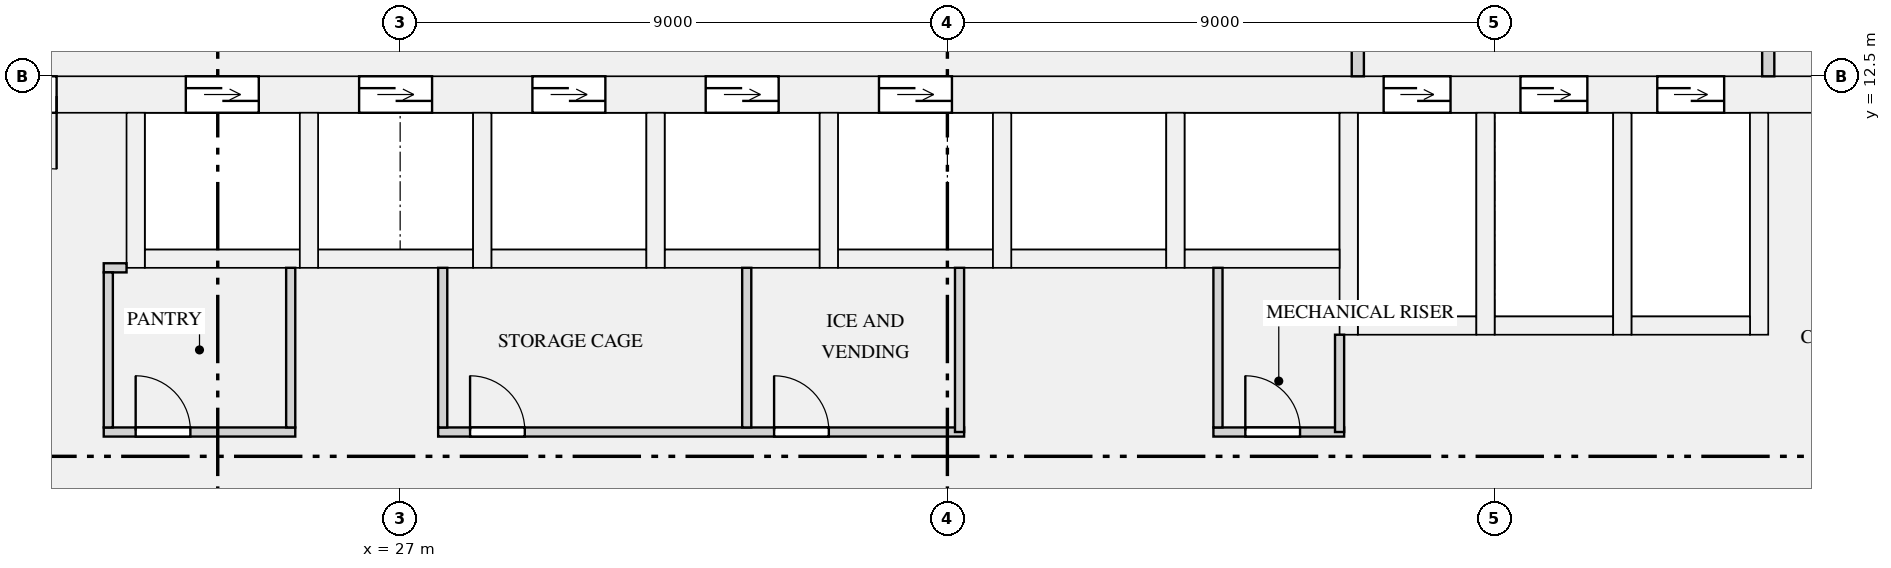
"""IFC4 building model, lengths in metres.
Left out: names, types, materials, properties, quantities, classifications, styles, units other than length and angle.
Written with IfcOpenShell. Run it as: python <this file> out.ifc"""

import sys

from ifc_helpers import new_model, si_unit, direction, frame, frame_2d, origin, place, context, subcontext, project, spatial, rectangle, extrude, element, fill, save


model = new_model("IFC4")
c1 = context("Model", 3, precision=1e-05, world=origin(), true_north=direction((0.0, 1.0)))
c2 = subcontext(c1, "Body", "Model", "MODEL_VIEW")
j1 = project(units=[si_unit("LENGTHUNIT", "METRE"), si_unit("PLANEANGLEUNIT", "RADIAN")], contexts=[c1])
p1 = place(None, origin())
s1 = spatial("IfcSite", under=j1, at=p1, CompositionType="ELEMENT")
p2 = place(p1, origin())
s2 = spatial("IfcBuilding", under=s1, at=p2, CompositionType="ELEMENT")
p3 = place(p2, frame((0.0, 0.0, 73.05)))
s3 = spatial("IfcBuildingStorey", under=s2, at=p3, CompositionType="ELEMENT", Elevation=73.05)
p4 = place(p3, frame((19.0, 12.2, 0.0), z_axis=(0.0, 0.0, 1.0), x_axis=(1.0, 0.0, 0.0)))
e1 = element("IfcWall", 1, at=p4, inside=s3, PredefinedType="SHEAR", context=c2, shape_type="SweptSolid", body=[
    extrude(rectangle(XDim=34.0, YDim=0.6, at=frame_2d((17.0, 0.0))), origin(), (0.0, 0.0, 1.0), 4.2),
])
p5 = place(p4, frame((4.475, 0.0, 0.0)))
e2 = element("IfcOpeningElement", 2, at=p5, cuts=e1, PredefinedType="OPENING", context=c2, shape_type="SweptSolid", body=[
    extrude(rectangle(XDim=1.2, YDim=2.1, at=frame_2d((0.6, 1.05))), frame((0.0, 0.31, 0.0), z_axis=(0.0, -1.0, 0.0), x_axis=(1.0, 0.0, 0.0)), (0.0, 0.0, 1.0), 0.62),
])
p6 = place(p4, frame((7.325, 0.0, 0.0)))
e3 = element("IfcOpeningElement", 3, at=p6, cuts=e1, PredefinedType="OPENING", context=c2, shape_type="SweptSolid", body=[
    extrude(rectangle(XDim=1.2, YDim=2.1, at=frame_2d((0.6, 1.05))), frame((0.0, 0.31, 0.0), z_axis=(0.0, -1.0, 0.0), x_axis=(1.0, 0.0, 0.0)), (0.0, 0.0, 1.0), 0.62),
])
p7 = place(p4, frame((10.175, 0.0, 0.0)))
e4 = element("IfcOpeningElement", 4, at=p7, cuts=e1, PredefinedType="OPENING", context=c2, shape_type="SweptSolid", body=[
    extrude(rectangle(XDim=1.2, YDim=2.1, at=frame_2d((0.6, 1.05))), frame((0.0, 0.31, 0.0), z_axis=(0.0, -1.0, 0.0), x_axis=(1.0, 0.0, 0.0)), (0.0, 0.0, 1.0), 0.62),
])
p8 = place(p4, frame((13.025, 0.0, 0.0)))
e5 = element("IfcOpeningElement", 5, at=p8, cuts=e1, PredefinedType="OPENING", context=c2, shape_type="SweptSolid", body=[
    extrude(rectangle(XDim=1.2, YDim=2.1, at=frame_2d((0.6, 1.05))), frame((0.0, 0.31, 0.0), z_axis=(0.0, -1.0, 0.0), x_axis=(1.0, 0.0, 0.0)), (0.0, 0.0, 1.0), 0.62),
])
p9 = place(p4, frame((15.875, 0.0, 0.0)))
e6 = element("IfcOpeningElement", 6, at=p9, cuts=e1, PredefinedType="OPENING", context=c2, shape_type="SweptSolid", body=[
    extrude(rectangle(XDim=1.2, YDim=2.1, at=frame_2d((0.6, 1.05))), frame((0.0, 0.31, 0.0), z_axis=(0.0, -1.0, 0.0), x_axis=(1.0, 0.0, 0.0)), (0.0, 0.0, 1.0), 0.62),
])
p10 = place(p4, frame((24.175, 0.0, 0.0)))
e7 = element("IfcOpeningElement", 7, at=p10, cuts=e1, PredefinedType="OPENING", context=c2, shape_type="SweptSolid", body=[
    extrude(rectangle(XDim=1.1, YDim=2.1, at=frame_2d((0.55, 1.05))), frame((0.0, 0.31, 0.0), z_axis=(0.0, -1.0, 0.0), x_axis=(1.0, 0.0, 0.0)), (0.0, 0.0, 1.0), 0.62),
])
p11 = place(p4, frame((26.425, 0.0, 0.0)))
e8 = element("IfcOpeningElement", 8, at=p11, cuts=e1, PredefinedType="OPENING", context=c2, shape_type="SweptSolid", body=[
    extrude(rectangle(XDim=1.1, YDim=2.1, at=frame_2d((0.55, 1.05))), frame((0.0, 0.31, 0.0), z_axis=(0.0, -1.0, 0.0), x_axis=(1.0, 0.0, 0.0)), (0.0, 0.0, 1.0), 0.62),
])
p12 = place(p4, frame((28.675, 0.0, 0.0)))
e9 = element("IfcOpeningElement", 9, at=p12, cuts=e1, PredefinedType="OPENING", context=c2, shape_type="SweptSolid", body=[
    extrude(rectangle(XDim=1.1, YDim=2.1, at=frame_2d((0.55, 1.05))), frame((0.0, 0.31, 0.0), z_axis=(0.0, -1.0, 0.0), x_axis=(1.0, 0.0, 0.0)), (0.0, 0.0, 1.0), 0.62),
])
p13 = place(p4, frame((1.15, 0.0, 0.0)))
e10 = element("IfcOpeningElement", 10, at=p13, cuts=e1, PredefinedType="OPENING", context=c2, shape_type="SweptSolid", body=[
    extrude(rectangle(XDim=1.2, YDim=2.1, at=frame_2d((0.6, 1.05))), frame((0.0, 0.31, 0.0), z_axis=(0.0, -1.0, 0.0), x_axis=(1.0, 0.0, 0.0)), (0.0, 0.0, 1.0), 0.62),
])
p14 = place(p4, frame((31.65, 0.0, 0.0)))
e11 = element("IfcOpeningElement", 11, at=p14, cuts=e1, PredefinedType="OPENING", context=c2, shape_type="SweptSolid", body=[
    extrude(rectangle(XDim=1.2, YDim=2.1, at=frame_2d((0.6, 1.05))), frame((0.0, 0.31, 0.0), z_axis=(0.0, -1.0, 0.0), x_axis=(1.0, 0.0, 0.0)), (0.0, 0.0, 1.0), 0.62),
])
p15 = place(p3, frame((22.8, 9.5, 0.0), z_axis=(0.0, 0.0, 1.0), x_axis=(1.0, 0.0, 0.0)))
e12 = element("IfcWall", 12, at=p15, inside=s3, PredefinedType="SHEAR", context=c2, shape_type="SweptSolid", body=[
    extrude(rectangle(XDim=2.55, YDim=0.3, at=frame_2d((1.275, 0.0))), origin(), (0.0, 0.0, 1.0), 4.2),
])
p16 = place(p3, frame((22.65, 9.35, 0.0), z_axis=(0.0, 0.0, 1.0), x_axis=(0.0, 1.0, 0.0)))
e13 = element("IfcWall", 13, at=p16, inside=s3, PredefinedType="SHEAR", context=c2, shape_type="SweptSolid", body=[
    extrude(rectangle(XDim=2.55, YDim=0.3, at=frame_2d((1.275, 0.0))), origin(), (0.0, 0.0, 1.0), 4.2),
])
p17 = place(p3, frame((25.65, 9.5, 0.0), z_axis=(0.0, 0.0, 1.0), x_axis=(1.0, 0.0, 0.0)))
e14 = element("IfcWall", 14, at=p17, inside=s3, PredefinedType="SHEAR", context=c2, shape_type="SweptSolid", body=[
    extrude(rectangle(XDim=2.55, YDim=0.3, at=frame_2d((1.275, 0.0))), origin(), (0.0, 0.0, 1.0), 4.2),
])
p18 = place(p3, frame((25.5, 9.35, 0.0), z_axis=(0.0, 0.0, 1.0), x_axis=(0.0, 1.0, 0.0)))
e15 = element("IfcWall", 15, at=p18, inside=s3, PredefinedType="SHEAR", context=c2, shape_type="SweptSolid", body=[
    extrude(rectangle(XDim=2.55, YDim=0.3, at=frame_2d((1.275, 0.0))), origin(), (0.0, 0.0, 1.0), 4.2),
])
p19 = place(p3, frame((28.5, 9.5, 0.0), z_axis=(0.0, 0.0, 1.0), x_axis=(1.0, 0.0, 0.0)))
e16 = element("IfcWall", 16, at=p19, inside=s3, PredefinedType="SHEAR", context=c2, shape_type="SweptSolid", body=[
    extrude(rectangle(XDim=2.55, YDim=0.3, at=frame_2d((1.275, 0.0))), origin(), (0.0, 0.0, 1.0), 4.2),
])
for number, where, z_axis, x_axis in (
    (17, (28.35, 9.35, 0.0), (0.0, 0.0, 1.0), (0.0, 1.0, 0.0)),
    (18, (31.35, 9.5, 0.0), (0.0, 0.0, 1.0), (1.0, 0.0, 0.0)),
    (19, (31.2, 9.35, 0.0), (0.0, 0.0, 1.0), (0.0, 1.0, 0.0)),
):
    element("IfcWall", number, at=place(p3, frame(where, z_axis=z_axis, x_axis=x_axis)), inside=s3, PredefinedType="SHEAR", context=c2, shape_type="SweptSolid", body=[
        extrude(rectangle(XDim=2.55, YDim=0.3, at=frame_2d((1.275, 0.0))), origin(), (0.0, 0.0, 1.0), 4.2),
    ])
p20 = place(p3, frame((34.2, 9.5, 0.0), z_axis=(0.0, 0.0, 1.0), x_axis=(1.0, 0.0, 0.0)))
e20 = element("IfcWall", 20, at=p20, inside=s3, PredefinedType="SHEAR", context=c2, shape_type="SweptSolid", body=[
    extrude(rectangle(XDim=2.55, YDim=0.3, at=frame_2d((1.275, 0.0))), origin(), (0.0, 0.0, 1.0), 4.2),
])
p21 = place(p3, frame((34.05, 9.35, 0.0), z_axis=(0.0, 0.0, 1.0), x_axis=(0.0, 1.0, 0.0)))
e21 = element("IfcWall", 21, at=p21, inside=s3, PredefinedType="SHEAR", context=c2, shape_type="SweptSolid", body=[
    extrude(rectangle(XDim=2.55, YDim=0.3, at=frame_2d((1.275, 0.0))), origin(), (0.0, 0.0, 1.0), 4.2),
])
p22 = place(p3, frame((37.05, 9.5, 0.0), z_axis=(0.0, 0.0, 1.0), x_axis=(1.0, 0.0, 0.0)))
e22 = element("IfcWall", 22, at=p22, inside=s3, PredefinedType="SHEAR", context=c2, shape_type="SweptSolid", body=[
    extrude(rectangle(XDim=2.55, YDim=0.3, at=frame_2d((1.275, 0.0))), origin(), (0.0, 0.0, 1.0), 4.2),
])
p23 = place(p3, frame((36.9, 9.35, 0.0), z_axis=(0.0, 0.0, 1.0), x_axis=(0.0, 1.0, 0.0)))
e23 = element("IfcWall", 23, at=p23, inside=s3, PredefinedType="SHEAR", context=c2, shape_type="SweptSolid", body=[
    extrude(rectangle(XDim=2.55, YDim=0.3, at=frame_2d((1.275, 0.0))), origin(), (0.0, 0.0, 1.0), 4.2),
])
p24 = place(p3, frame((39.9, 9.5, 0.0), z_axis=(0.0, 0.0, 1.0), x_axis=(1.0, 0.0, 0.0)))
e24 = element("IfcWall", 24, at=p24, inside=s3, PredefinedType="SHEAR", context=c2, shape_type="SweptSolid", body=[
    extrude(rectangle(XDim=2.55, YDim=0.3, at=frame_2d((1.275, 0.0))), origin(), (0.0, 0.0, 1.0), 4.2),
])
p25 = place(p3, frame((39.75, 9.35, 0.0), z_axis=(0.0, 0.0, 1.0), x_axis=(0.0, 1.0, 0.0)))
e25 = element("IfcWall", 25, at=p25, inside=s3, PredefinedType="SHEAR", context=c2, shape_type="SweptSolid", body=[
    extrude(rectangle(XDim=2.55, YDim=0.3, at=frame_2d((1.275, 0.0))), origin(), (0.0, 0.0, 1.0), 4.2),
])
p26 = place(p3, frame((42.75, 8.4, 0.0), z_axis=(0.0, 0.0, 1.0), x_axis=(1.0, 0.0, 0.0)))
e26 = element("IfcWall", 26, at=p26, inside=s3, PredefinedType="SHEAR", context=c2, shape_type="SweptSolid", body=[
    extrude(rectangle(XDim=1.95, YDim=0.3, at=frame_2d((0.975, 0.0))), origin(), (0.0, 0.0, 1.0), 4.2),
])
p27 = place(p3, frame((42.6, 8.25, 0.0), z_axis=(0.0, 0.0, 1.0), x_axis=(0.0, 1.0, 0.0)))
e27 = element("IfcWall", 27, at=p27, inside=s3, PredefinedType="SHEAR", context=c2, shape_type="SweptSolid", body=[
    extrude(rectangle(XDim=3.65, YDim=0.3, at=frame_2d((1.825, 0.0))), origin(), (0.0, 0.0, 1.0), 4.2),
])
p28 = place(p3, frame((45.0, 8.4, 0.0), z_axis=(0.0, 0.0, 1.0), x_axis=(1.0, 0.0, 0.0)))
e28 = element("IfcWall", 28, at=p28, inside=s3, PredefinedType="SHEAR", context=c2, shape_type="SweptSolid", body=[
    extrude(rectangle(XDim=1.95, YDim=0.3, at=frame_2d((0.975, 0.0))), origin(), (0.0, 0.0, 1.0), 4.2),
])
p29 = place(p3, frame((44.85, 8.25, 0.0), z_axis=(0.0, 0.0, 1.0), x_axis=(0.0, 1.0, 0.0)))
e29 = element("IfcWall", 29, at=p29, inside=s3, PredefinedType="SHEAR", context=c2, shape_type="SweptSolid", body=[
    extrude(rectangle(XDim=3.65, YDim=0.3, at=frame_2d((1.825, 0.0))), origin(), (0.0, 0.0, 1.0), 4.2),
])
p30 = place(p3, frame((47.25, 8.4, 0.0), z_axis=(0.0, 0.0, 1.0), x_axis=(1.0, 0.0, 0.0)))
e30 = element("IfcWall", 30, at=p30, inside=s3, PredefinedType="SHEAR", context=c2, shape_type="SweptSolid", body=[
    extrude(rectangle(XDim=1.95, YDim=0.3, at=frame_2d((0.975, 0.0))), origin(), (0.0, 0.0, 1.0), 4.2),
])
for number, where, z_axis, x_axis in (
    (31, (47.1, 8.25, 0.0), (0.0, 0.0, 1.0), (0.0, 1.0, 0.0)),
    (32, (49.35, 8.25, 0.0), (0.0, 0.0, 1.0), (0.0, 1.0, 0.0)),
):
    element("IfcWall", number, at=place(p3, frame(where, z_axis=z_axis, x_axis=x_axis)), inside=s3, PredefinedType="SHEAR", context=c2, shape_type="SweptSolid", body=[
        extrude(rectangle(XDim=3.65, YDim=0.3, at=frame_2d((1.825, 0.0))), origin(), (0.0, 0.0, 1.0), 4.2),
    ])
p31 = place(p3, frame((22.125, 6.65, 0.0), z_axis=(0.0, 0.0, 1.0), x_axis=(1.0, 0.0, 0.0)))
e33 = element("IfcWall", 33, at=p31, inside=s3, PredefinedType="PARTITIONING", context=c2, shape_type="SweptSolid", body=[
    extrude(rectangle(XDim=3.15, YDim=0.15, at=frame_2d((1.575, 0.0))), origin(), (0.0, 0.0, 1.0), 3.7),
])
p32 = place(p31, frame((0.525, 0.0, 0.0)))
e34 = element("IfcOpeningElement", 34, at=p32, cuts=e33, PredefinedType="OPENING", context=c2, shape_type="SweptSolid", body=[
    extrude(rectangle(XDim=0.9, YDim=2.1, at=frame_2d((0.45, 1.05))), frame((0.0, 0.085, 0.0), z_axis=(0.0, -1.0, 0.0), x_axis=(1.0, 0.0, 0.0)), (0.0, 0.0, 1.0), 0.17),
])
p33 = place(p3, frame((27.625, 6.65, 0.0), z_axis=(0.0, 0.0, 1.0), x_axis=(1.0, 0.0, 0.0)))
e35 = element("IfcWall", 35, at=p33, inside=s3, PredefinedType="PARTITIONING", context=c2, shape_type="SweptSolid", body=[
    extrude(rectangle(XDim=8.65, YDim=0.15, at=frame_2d((4.325, 0.0))), origin(), (0.0, 0.0, 1.0), 3.7),
])
p34 = place(p33, frame((0.525, 0.0, 0.0)))
e36 = element("IfcOpeningElement", 36, at=p34, cuts=e35, PredefinedType="OPENING", context=c2, shape_type="SweptSolid", body=[
    extrude(rectangle(XDim=0.9, YDim=2.1, at=frame_2d((0.45, 1.05))), frame((0.0, 0.085, 0.0), z_axis=(0.0, -1.0, 0.0), x_axis=(1.0, 0.0, 0.0)), (0.0, 0.0, 1.0), 0.17),
])
p35 = place(p33, frame((5.525, 0.0, 0.0)))
e37 = element("IfcOpeningElement", 37, at=p35, cuts=e35, PredefinedType="OPENING", context=c2, shape_type="SweptSolid", body=[
    extrude(rectangle(XDim=0.9, YDim=2.1, at=frame_2d((0.45, 1.05))), frame((0.0, 0.085, 0.0), z_axis=(0.0, -1.0, 0.0), x_axis=(1.0, 0.0, 0.0)), (0.0, 0.0, 1.0), 0.17),
])
p36 = place(p3, frame((40.375, 6.65, 0.0), z_axis=(0.0, 0.0, 1.0), x_axis=(1.0, 0.0, 0.0)))
e38 = element("IfcWall", 38, at=p36, inside=s3, PredefinedType="PARTITIONING", context=c2, shape_type="SweptSolid", body=[
    extrude(rectangle(XDim=2.15, YDim=0.15, at=frame_2d((1.075, 0.0))), origin(), (0.0, 0.0, 1.0), 3.7),
])
p37 = place(p36, frame((0.525, 0.0, 0.0)))
e39 = element("IfcOpeningElement", 39, at=p37, cuts=e38, PredefinedType="OPENING", context=c2, shape_type="SweptSolid", body=[
    extrude(rectangle(XDim=0.9, YDim=2.1, at=frame_2d((0.45, 1.05))), frame((0.0, 0.085, 0.0), z_axis=(0.0, -1.0, 0.0), x_axis=(1.0, 0.0, 0.0)), (0.0, 0.0, 1.0), 0.17),
])
p38 = place(p3, frame((22.125, 9.35, 0.0), z_axis=(0.0, 0.0, 1.0), x_axis=(1.0, 0.0, 0.0)))
e40 = element("IfcWall", 40, at=p38, inside=s3, PredefinedType="PARTITIONING", context=c2, shape_type="SweptSolid", body=[
    extrude(rectangle(XDim=0.375, YDim=0.15, at=frame_2d((0.188, 0.0))), origin(), (0.0, 0.0, 1.0), 3.7),
])
p39 = place(p3, frame((36.2, 6.65, 0.0), z_axis=(0.0, 0.0, 1.0), x_axis=(0.0, 1.0, 0.0)))
e41 = element("IfcWall", 41, at=p39, inside=s3, PredefinedType="PARTITIONING", context=c2, shape_type="SweptSolid", body=[
    extrude(rectangle(XDim=2.7, YDim=0.15, at=frame_2d((1.35, 0.0))), origin(), (0.0, 0.0, 1.0), 3.7),
])
p40 = place(p3, frame((42.45, 6.65, 0.0), z_axis=(0.0, 0.0, 1.0), x_axis=(0.0, 1.0, 0.0)))
e42 = element("IfcWall", 42, at=p40, inside=s3, PredefinedType="PARTITIONING", context=c2, shape_type="SweptSolid", body=[
    extrude(rectangle(XDim=1.6, YDim=0.15, at=frame_2d((0.8, 0.0))), origin(), (0.0, 0.0, 1.0), 3.7),
])
p41 = place(p3, frame((22.2, 6.725, 0.0), z_axis=(0.0, 0.0, 1.0), x_axis=(0.0, 1.0, 0.0)))
e43 = element("IfcWall", 43, at=p41, inside=s3, PredefinedType="PARTITIONING", context=c2, shape_type="SweptSolid", body=[
    extrude(rectangle(XDim=2.55, YDim=0.15, at=frame_2d((1.275, 0.0))), origin(), (0.0, 0.0, 1.0), 3.7),
])
for number, where, z_axis, x_axis in (
    (44, (25.2, 6.725, 0.0), (0.0, 0.0, 1.0), (0.0, 1.0, 0.0)),
    (45, (27.7, 6.725, 0.0), (0.0, 0.0, 1.0), (0.0, 1.0, 0.0)),
    (46, (32.7, 6.725, 0.0), (0.0, 0.0, 1.0), (0.0, 1.0, 0.0)),
    (47, (40.45, 6.725, 0.0), (0.0, 0.0, 1.0), (0.0, 1.0, 0.0)),
):
    element("IfcWall", number, at=place(p3, frame(where, z_axis=z_axis, x_axis=x_axis)), inside=s3, PredefinedType="PARTITIONING", context=c2, shape_type="SweptSolid", body=[
        extrude(rectangle(XDim=2.625, YDim=0.15, at=frame_2d((1.312, 0.0))), origin(), (0.0, 0.0, 1.0), 3.7),
    ])
p42 = place(p3, frame((42.75, 12.5, 0.0), z_axis=(0.0, 0.0, 1.0), x_axis=(0.0, 1.0, 0.0)))
e48 = element("IfcWall", 48, at=p42, inside=s3, PredefinedType="PARTITIONING", context=c2, shape_type="SweptSolid", body=[
    extrude(rectangle(XDim=3.4, YDim=0.2, at=frame_2d((1.7, 0.0))), origin(), (0.0, 0.0, 1.0), 3.7),
])
p43 = place(p42, frame((2.2, 0.0, 0.0)))
e49 = element("IfcOpeningElement", 49, at=p43, cuts=e48, PredefinedType="OPENING", context=c2, shape_type="SweptSolid", body=[
    extrude(rectangle(XDim=1.0, YDim=2.1, at=frame_2d((0.5, 1.05))), frame((0.0, 0.11, 0.0), z_axis=(0.0, -1.0, 0.0), x_axis=(1.0, 0.0, 0.0)), (0.0, 0.0, 1.0), 0.22),
])
p44 = place(p3, frame((49.5, 12.5, 0.0), z_axis=(0.0, 0.0, 1.0), x_axis=(0.0, 1.0, 0.0)))
e50 = element("IfcWall", 50, at=p44, inside=s3, PredefinedType="PARTITIONING", context=c2, shape_type="SweptSolid", body=[
    extrude(rectangle(XDim=3.4, YDim=0.2, at=frame_2d((1.7, 0.0))), origin(), (0.0, 0.0, 1.0), 3.7),
])
p45 = place(p44, frame((1.15, 0.0, 0.0)))
e51 = element("IfcOpeningElement", 51, at=p45, cuts=e50, PredefinedType="OPENING", context=c2, shape_type="SweptSolid", body=[
    extrude(rectangle(XDim=1.1, YDim=2.1, at=frame_2d((0.55, 1.05))), frame((0.0, 0.11, 0.0), z_axis=(0.0, -1.0, 0.0), x_axis=(1.0, 0.0, 0.0)), (0.0, 0.0, 1.0), 0.22),
])
p46 = place(p5, origin())
e52 = element("IfcDoor", 52, at=p46, inside=s3, OperationType="DOUBLE_DOOR_SLIDING", PredefinedType="DOOR", context=c2, shape_type="SweptSolid", body=[
    extrude(rectangle(XDim=1.2, YDim=2.1, at=frame_2d((0.6, 1.05))), frame((0.0, 0.025, 0.0), z_axis=(0.0, -1.0, 0.0), x_axis=(1.0, 0.0, 0.0)), (0.0, 0.0, 1.0), 0.05),
])
fill(e2, e52)
p47 = place(p6, origin())
e53 = element("IfcDoor", 53, at=p47, inside=s3, OperationType="DOUBLE_DOOR_SLIDING", PredefinedType="DOOR", context=c2, shape_type="SweptSolid", body=[
    extrude(rectangle(XDim=1.2, YDim=2.1, at=frame_2d((0.6, 1.05))), frame((0.0, 0.025, 0.0), z_axis=(0.0, -1.0, 0.0), x_axis=(1.0, 0.0, 0.0)), (0.0, 0.0, 1.0), 0.05),
])
fill(e3, e53)
p48 = place(p7, origin())
e54 = element("IfcDoor", 54, at=p48, inside=s3, OperationType="DOUBLE_DOOR_SLIDING", PredefinedType="DOOR", context=c2, shape_type="SweptSolid", body=[
    extrude(rectangle(XDim=1.2, YDim=2.1, at=frame_2d((0.6, 1.05))), frame((0.0, 0.025, 0.0), z_axis=(0.0, -1.0, 0.0), x_axis=(1.0, 0.0, 0.0)), (0.0, 0.0, 1.0), 0.05),
])
fill(e4, e54)
p49 = place(p8, origin())
e55 = element("IfcDoor", 55, at=p49, inside=s3, OperationType="DOUBLE_DOOR_SLIDING", PredefinedType="DOOR", context=c2, shape_type="SweptSolid", body=[
    extrude(rectangle(XDim=1.2, YDim=2.1, at=frame_2d((0.6, 1.05))), frame((0.0, 0.025, 0.0), z_axis=(0.0, -1.0, 0.0), x_axis=(1.0, 0.0, 0.0)), (0.0, 0.0, 1.0), 0.05),
])
fill(e5, e55)
p50 = place(p9, origin())
e56 = element("IfcDoor", 56, at=p50, inside=s3, OperationType="DOUBLE_DOOR_SLIDING", PredefinedType="DOOR", context=c2, shape_type="SweptSolid", body=[
    extrude(rectangle(XDim=1.2, YDim=2.1, at=frame_2d((0.6, 1.05))), frame((0.0, 0.025, 0.0), z_axis=(0.0, -1.0, 0.0), x_axis=(1.0, 0.0, 0.0)), (0.0, 0.0, 1.0), 0.05),
])
fill(e6, e56)
p51 = place(p10, origin())
e57 = element("IfcDoor", 57, at=p51, inside=s3, OperationType="DOUBLE_DOOR_SLIDING", PredefinedType="DOOR", context=c2, shape_type="SweptSolid", body=[
    extrude(rectangle(XDim=1.1, YDim=2.1, at=frame_2d((0.55, 1.05))), frame((0.0, 0.025, 0.0), z_axis=(0.0, -1.0, 0.0), x_axis=(1.0, 0.0, 0.0)), (0.0, 0.0, 1.0), 0.05),
])
fill(e7, e57)
p52 = place(p11, origin())
e58 = element("IfcDoor", 58, at=p52, inside=s3, OperationType="DOUBLE_DOOR_SLIDING", PredefinedType="DOOR", context=c2, shape_type="SweptSolid", body=[
    extrude(rectangle(XDim=1.1, YDim=2.1, at=frame_2d((0.55, 1.05))), frame((0.0, 0.025, 0.0), z_axis=(0.0, -1.0, 0.0), x_axis=(1.0, 0.0, 0.0)), (0.0, 0.0, 1.0), 0.05),
])
fill(e8, e58)
p53 = place(p12, origin())
e59 = element("IfcDoor", 59, at=p53, inside=s3, OperationType="DOUBLE_DOOR_SLIDING", PredefinedType="DOOR", context=c2, shape_type="SweptSolid", body=[
    extrude(rectangle(XDim=1.1, YDim=2.1, at=frame_2d((0.55, 1.05))), frame((0.0, 0.025, 0.0), z_axis=(0.0, -1.0, 0.0), x_axis=(1.0, 0.0, 0.0)), (0.0, 0.0, 1.0), 0.05),
])
fill(e9, e59)
p54 = place(p32, origin())
e60 = element("IfcDoor", 60, at=p54, inside=s3, OperationType="SINGLE_SWING_LEFT", PredefinedType="DOOR", context=c2, shape_type="SweptSolid", body=[
    extrude(rectangle(XDim=0.9, YDim=2.1, at=frame_2d((0.45, 1.05))), frame((0.0, 0.025, 0.0), z_axis=(0.0, -1.0, 0.0), x_axis=(1.0, 0.0, 0.0)), (0.0, 0.0, 1.0), 0.05),
])
fill(e34, e60)
p55 = place(p34, origin())
e61 = element("IfcDoor", 61, at=p55, inside=s3, OperationType="SINGLE_SWING_LEFT", PredefinedType="DOOR", context=c2, shape_type="SweptSolid", body=[
    extrude(rectangle(XDim=0.9, YDim=2.1, at=frame_2d((0.45, 1.05))), frame((0.0, 0.025, 0.0), z_axis=(0.0, -1.0, 0.0), x_axis=(1.0, 0.0, 0.0)), (0.0, 0.0, 1.0), 0.05),
])
fill(e36, e61)
p56 = place(p35, origin())
e62 = element("IfcDoor", 62, at=p56, inside=s3, OperationType="SINGLE_SWING_LEFT", PredefinedType="DOOR", context=c2, shape_type="SweptSolid", body=[
    extrude(rectangle(XDim=0.9, YDim=2.1, at=frame_2d((0.45, 1.05))), frame((0.0, 0.025, 0.0), z_axis=(0.0, -1.0, 0.0), x_axis=(1.0, 0.0, 0.0)), (0.0, 0.0, 1.0), 0.05),
])
fill(e37, e62)
p57 = place(p37, origin())
e63 = element("IfcDoor", 63, at=p57, inside=s3, OperationType="SINGLE_SWING_LEFT", PredefinedType="DOOR", context=c2, shape_type="SweptSolid", body=[
    extrude(rectangle(XDim=0.9, YDim=2.1, at=frame_2d((0.45, 1.05))), frame((0.0, 0.025, 0.0), z_axis=(0.0, -1.0, 0.0), x_axis=(1.0, 0.0, 0.0)), (0.0, 0.0, 1.0), 0.05),
])
fill(e39, e63)
p58 = place(p13, frame((1.2, 0.0, 0.0), z_axis=(0.0, 0.0, 1.0), x_axis=(-1.0, 0.0, 0.0)))
e64 = element("IfcDoor", 64, at=p58, inside=s3, OperationType="SINGLE_SWING_LEFT", PredefinedType="DOOR", context=c2, shape_type="SweptSolid", body=[
    extrude(rectangle(XDim=1.2, YDim=2.1, at=frame_2d((0.6, 1.05))), frame((0.0, 0.025, 0.0), z_axis=(0.0, -1.0, 0.0), x_axis=(1.0, 0.0, 0.0)), (0.0, 0.0, 1.0), 0.05),
])
fill(e10, e64)
save(model, sys.argv[1])
